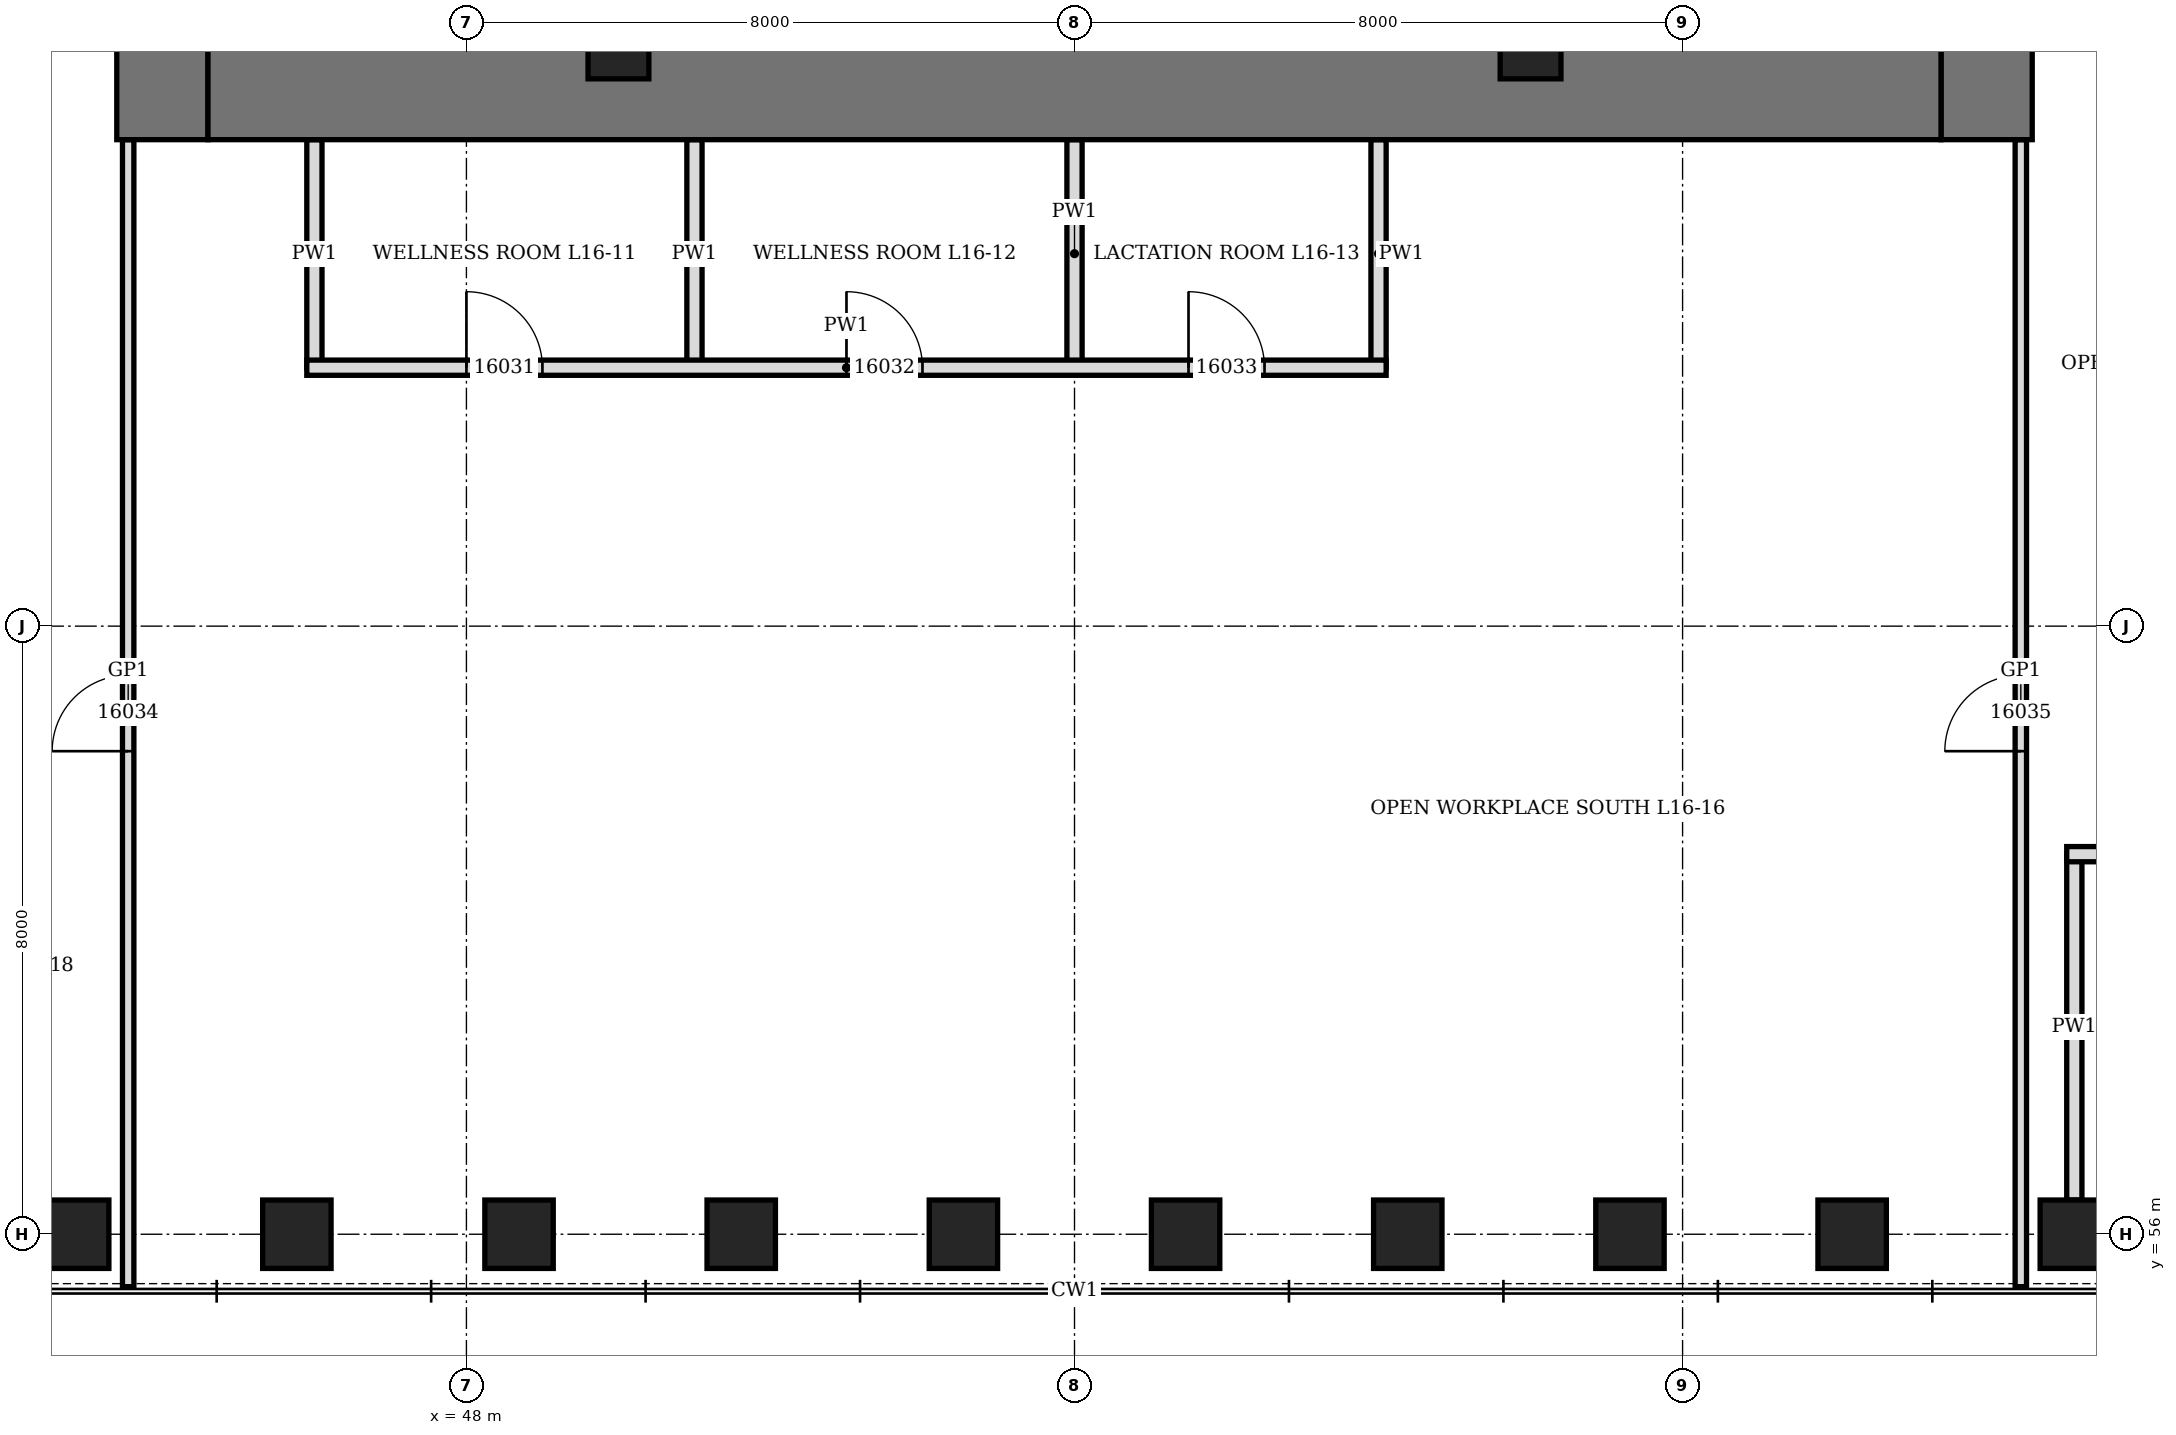
"""IFC4 building model, lengths in metres.
Left out: names, types, materials, properties, quantities, classifications, styles, units other than length and angle.
Written with IfcOpenShell. Run it as: python <this file> out.ifc"""

import sys

from ifc_helpers import new_model, si_unit, direction, frame, frame_2d, origin, origin_2d, place, context, subcontext, project, spatial, rectangle, hollow_rectangle, extrude, element, fill, save


model = new_model("IFC4")
c1 = context("Model", 3, precision=1e-05, world=origin(), true_north=direction((0.0, 1.0)))
c2 = subcontext(c1, "Body", "Model", "MODEL_VIEW")
j1 = project(units=[si_unit("LENGTHUNIT", "METRE"), si_unit("PLANEANGLEUNIT", "RADIAN")], contexts=[c1])
p1 = place(None, origin())
s1 = spatial("IfcSite", under=j1, at=p1, CompositionType="ELEMENT")
p2 = place(p1, origin())
s2 = spatial("IfcBuilding", under=s1, at=p2, CompositionType="ELEMENT")
p3 = place(p2, frame((0.0, 0.0, 76.9)))
s3 = spatial("IfcBuildingStorey", under=s2, at=p3, CompositionType="ELEMENT", Elevation=76.9)
for number, where, z_axis, x_axis in (
    (1, (42.846, 56.0, 0.0), (0.0, 0.0, 1.0), (1.0, 0.0, 0.0)),
    (2, (45.769, 56.0, 0.0), (0.0, 0.0, 1.0), (1.0, 0.0, 0.0)),
    (3, (48.692, 56.0, 0.0), (0.0, 0.0, 1.0), (1.0, 0.0, 0.0)),
    (4, (51.615, 56.0, 0.0), (0.0, 0.0, 1.0), (1.0, 0.0, 0.0)),
    (5, (54.539, 56.0, 0.0), (0.0, 0.0, 1.0), (1.0, 0.0, 0.0)),
    (6, (57.461, 56.0, 0.0), (0.0, 0.0, 1.0), (1.0, 0.0, 0.0)),
    (7, (60.385, 56.0, 0.0), (0.0, 0.0, 1.0), (1.0, 0.0, 0.0)),
    (8, (63.308, 56.0, 0.0), (0.0, 0.0, 1.0), (1.0, 0.0, 0.0)),
    (9, (66.231, 56.0, 0.0), (0.0, 0.0, 1.0), (1.0, 0.0, 0.0)),
    (10, (69.154, 56.0, 0.0), (0.0, 0.0, 1.0), (1.0, 0.0, 0.0)),
):
    element("IfcColumn", number, at=place(p3, frame(where, z_axis=z_axis, x_axis=x_axis)), inside=s3, PredefinedType="COLUMN", context=c2, shape_type="SweptSolid", body=[
        extrude(hollow_rectangle(XDim=0.9, YDim=0.9, WallThickness=0.12, at=origin_2d()), origin(), (0.0, 0.0, 1.0), 4.2),
    ])
p4 = place(p3, frame((44.0, 70.4, 0.0), z_axis=(0.0, 0.0, 1.0), x_axis=(0.0, 1.0, 0.0)))
e11 = element("IfcWall", 11, at=p4, inside=s3, PredefinedType="SHEAR", context=c2, shape_type="SweptSolid", body=[
    extrude(rectangle(XDim=19.2, YDim=1.2, at=frame_2d((9.6, 0.0))), origin(), (0.0, 0.0, 1.0), 4.2),
])
p5 = place(p4, frame((8.6, 0.0, 0.0)))
e12 = element("IfcOpeningElement", 12, at=p5, cuts=e11, PredefinedType="OPENING", context=c2, shape_type="SweptSolid", body=[
    extrude(rectangle(XDim=2.0, YDim=2.4, at=frame_2d((1.0, 1.2))), frame((0.0, 0.61, 0.0), z_axis=(0.0, -1.0, 0.0), x_axis=(1.0, 0.0, 0.0)), (0.0, 0.0, 1.0), 1.22),
])
p6 = place(p3, frame((68.0, 70.4, 0.0), z_axis=(0.0, 0.0, 1.0), x_axis=(0.0, 1.0, 0.0)))
e13 = element("IfcWall", 13, at=p6, inside=s3, PredefinedType="SHEAR", context=c2, shape_type="SweptSolid", body=[
    extrude(rectangle(XDim=19.2, YDim=1.2, at=frame_2d((9.6, 0.0))), origin(), (0.0, 0.0, 1.0), 4.2),
])
p7 = place(p6, frame((8.6, 0.0, 0.0)))
e14 = element("IfcOpeningElement", 14, at=p7, cuts=e13, PredefinedType="OPENING", context=c2, shape_type="SweptSolid", body=[
    extrude(rectangle(XDim=2.0, YDim=2.4, at=frame_2d((1.0, 1.2))), frame((0.0, 0.61, 0.0), z_axis=(0.0, -1.0, 0.0), x_axis=(1.0, 0.0, 0.0)), (0.0, 0.0, 1.0), 1.22),
])
p8 = place(p3, frame((44.6, 71.0, 0.0), z_axis=(0.0, 0.0, 1.0), x_axis=(1.0, 0.0, 0.0)))
e15 = element("IfcWall", 15, at=p8, inside=s3, PredefinedType="SHEAR", context=c2, shape_type="SweptSolid", body=[
    extrude(rectangle(XDim=22.8, YDim=1.2, at=frame_2d((11.4, 0.0))), origin(), (0.0, 0.0, 1.0), 4.2),
])
for number, where, z_axis, x_axis in (
    (16, (50.0, 71.6, 0.0), (0.0, 0.0, 1.0), (1.0, 0.0, 0.0)),
    (17, (62.0, 71.6, 0.0), (0.0, 0.0, 1.0), (1.0, 0.0, 0.0)),
):
    element("IfcColumn", number, at=place(p3, frame(where, z_axis=z_axis, x_axis=x_axis)), inside=s3, PredefinedType="COLUMN", context=c2, shape_type="SweptSolid", body=[
        extrude(hollow_rectangle(XDim=0.8, YDim=0.8, WallThickness=0.1, at=origin_2d()), origin(), (0.0, 0.0, 1.0), 4.2),
    ])
p9 = place(p3, frame((69.154, 56.45, 0.0), z_axis=(0.0, 0.0, 1.0), x_axis=(0.0, 1.0, 0.0)))
e18 = element("IfcWall", 18, at=p9, inside=s3, PredefinedType="PARTITIONING", context=c2, shape_type="SweptSolid", body=[
    extrude(rectangle(XDim=4.55, YDim=0.2, at=frame_2d((2.275, 0.0))), origin(), (0.0, 0.0, 1.0), 3.278),
])
for number, where, z_axis, x_axis in (
    (19, (46.0, 67.4, 0.0), (0.0, 0.0, 1.0), (0.0, 1.0, 0.0)),
    (20, (51.0, 67.4, 0.0), (0.0, 0.0, 1.0), (0.0, 1.0, 0.0)),
    (21, (56.0, 67.4, 0.0), (0.0, 0.0, 1.0), (0.0, 1.0, 0.0)),
    (22, (60.0, 67.4, 0.0), (0.0, 0.0, 1.0), (0.0, 1.0, 0.0)),
):
    element("IfcWall", number, at=place(p3, frame(where, z_axis=z_axis, x_axis=x_axis)), inside=s3, PredefinedType="PARTITIONING", context=c2, shape_type="SweptSolid", body=[
        extrude(rectangle(XDim=3.0, YDim=0.2, at=frame_2d((1.5, 0.0))), origin(), (0.0, 0.0, 1.0), 4.04),
    ])
p10 = place(p3, frame((69.054, 61.0, 0.0), z_axis=(0.0, 0.0, 1.0), x_axis=(1.0, 0.0, 0.0)))
e23 = element("IfcWall", 23, at=p10, inside=s3, PredefinedType="PARTITIONING", context=c2, shape_type="SweptSolid", body=[
    extrude(rectangle(XDim=5.496, YDim=0.2, at=frame_2d((2.748, 0.0))), origin(), (0.0, 0.0, 1.0), 4.04),
])
p11 = place(p10, frame((1.062, 0.0, 0.0)))
e24 = element("IfcOpeningElement", 24, at=p11, cuts=e23, PredefinedType="OPENING", context=c2, shape_type="SweptSolid", body=[
    extrude(rectangle(XDim=1.0, YDim=2.1, at=frame_2d((0.5, 1.05))), frame((0.0, 0.11, 0.0), z_axis=(0.0, -1.0, 0.0), x_axis=(1.0, 0.0, 0.0)), (0.0, 0.0, 1.0), 0.22),
])
p12 = place(p3, frame((45.9, 67.4, 0.0), z_axis=(0.0, 0.0, 1.0), x_axis=(1.0, 0.0, 0.0)))
e25 = element("IfcWall", 25, at=p12, inside=s3, PredefinedType="PARTITIONING", context=c2, shape_type="SweptSolid", body=[
    extrude(rectangle(XDim=14.2, YDim=0.2, at=frame_2d((7.1, 0.0))), origin(), (0.0, 0.0, 1.0), 4.04),
])
p13 = place(p12, frame((2.1, 0.0, 0.0)))
e26 = element("IfcOpeningElement", 26, at=p13, cuts=e25, PredefinedType="OPENING", context=c2, shape_type="SweptSolid", body=[
    extrude(rectangle(XDim=1.0, YDim=2.1, at=frame_2d((0.5, 1.05))), frame((0.0, 0.11, 0.0), z_axis=(0.0, -1.0, 0.0), x_axis=(1.0, 0.0, 0.0)), (0.0, 0.0, 1.0), 0.22),
])
p14 = place(p12, frame((7.1, 0.0, 0.0)))
e27 = element("IfcOpeningElement", 27, at=p14, cuts=e25, PredefinedType="OPENING", context=c2, shape_type="SweptSolid", body=[
    extrude(rectangle(XDim=1.0, YDim=2.1, at=frame_2d((0.5, 1.05))), frame((0.0, 0.11, 0.0), z_axis=(0.0, -1.0, 0.0), x_axis=(1.0, 0.0, 0.0)), (0.0, 0.0, 1.0), 0.22),
])
p15 = place(p12, frame((11.6, 0.0, 0.0)))
e28 = element("IfcOpeningElement", 28, at=p15, cuts=e25, PredefinedType="OPENING", context=c2, shape_type="SweptSolid", body=[
    extrude(rectangle(XDim=1.0, YDim=2.1, at=frame_2d((0.5, 1.05))), frame((0.0, 0.11, 0.0), z_axis=(0.0, -1.0, 0.0), x_axis=(1.0, 0.0, 0.0)), (0.0, 0.0, 1.0), 0.22),
])
p16 = place(p3, frame((43.55, 55.31, 0.0), z_axis=(0.0, 0.0, 1.0), x_axis=(0.0, 1.0, 0.0)))
e29 = element("IfcWall", 29, at=p16, inside=s3, PredefinedType="PARTITIONING", context=c2, shape_type="SweptSolid", body=[
    extrude(rectangle(XDim=15.09, YDim=0.15, at=frame_2d((7.545, 0.0))), origin(), (0.0, 0.0, 1.0), 4.04),
])
p17 = place(p16, frame((7.045, 0.0, 0.0)))
e30 = element("IfcOpeningElement", 30, at=p17, cuts=e29, PredefinedType="OPENING", context=c2, shape_type="SweptSolid", body=[
    extrude(rectangle(XDim=1.0, YDim=2.4, at=frame_2d((0.5, 1.2))), frame((0.0, 0.085, 0.0), z_axis=(0.0, -1.0, 0.0), x_axis=(1.0, 0.0, 0.0)), (0.0, 0.0, 1.0), 0.17),
])
p18 = place(p3, frame((68.45, 55.31, 0.0), z_axis=(0.0, 0.0, 1.0), x_axis=(0.0, 1.0, 0.0)))
e31 = element("IfcWall", 31, at=p18, inside=s3, PredefinedType="PARTITIONING", context=c2, shape_type="SweptSolid", body=[
    extrude(rectangle(XDim=15.09, YDim=0.15, at=frame_2d((7.545, 0.0))), origin(), (0.0, 0.0, 1.0), 4.04),
])
p19 = place(p18, frame((7.045, 0.0, 0.0)))
e32 = element("IfcOpeningElement", 32, at=p19, cuts=e31, PredefinedType="OPENING", context=c2, shape_type="SweptSolid", body=[
    extrude(rectangle(XDim=1.0, YDim=2.4, at=frame_2d((0.5, 1.2))), frame((0.0, 0.085, 0.0), z_axis=(0.0, -1.0, 0.0), x_axis=(1.0, 0.0, 0.0)), (0.0, 0.0, 1.0), 0.17),
])
p20 = place(p13, origin())
e33 = element("IfcDoor", 33, at=p20, inside=s3, OperationType="SINGLE_SWING_LEFT", PredefinedType="DOOR", context=c2, shape_type="SweptSolid", body=[
    extrude(rectangle(XDim=1.0, YDim=2.1, at=frame_2d((0.5, 1.05))), frame((0.0, 0.1, 0.0), z_axis=(0.0, -1.0, 0.0), x_axis=(1.0, 0.0, 0.0)), (0.0, 0.0, 1.0), 0.199),
])
fill(e26, e33)
p21 = place(p14, origin())
e34 = element("IfcDoor", 34, at=p21, inside=s3, OperationType="SINGLE_SWING_LEFT", PredefinedType="DOOR", context=c2, shape_type="SweptSolid", body=[
    extrude(rectangle(XDim=1.0, YDim=2.1, at=frame_2d((0.5, 1.05))), frame((0.0, 0.1, 0.0), z_axis=(0.0, -1.0, 0.0), x_axis=(1.0, 0.0, 0.0)), (0.0, 0.0, 1.0), 0.199),
])
fill(e27, e34)
p22 = place(p15, origin())
e35 = element("IfcDoor", 35, at=p22, inside=s3, OperationType="SINGLE_SWING_LEFT", PredefinedType="DOOR", context=c2, shape_type="SweptSolid", body=[
    extrude(rectangle(XDim=1.0, YDim=2.1, at=frame_2d((0.5, 1.05))), frame((0.0, 0.1, 0.0), z_axis=(0.0, -1.0, 0.0), x_axis=(1.0, 0.0, 0.0)), (0.0, 0.0, 1.0), 0.199),
])
fill(e28, e35)
p23 = place(p17, origin())
e36 = element("IfcDoor", 36, at=p23, inside=s3, OperationType="SINGLE_SWING_RIGHT", PredefinedType="DOOR", context=c2, shape_type="SweptSolid", body=[
    extrude(rectangle(XDim=1.0, YDim=2.4, at=frame_2d((0.5, 1.2))), frame((0.0, 0.075, 0.0), z_axis=(0.0, -1.0, 0.0), x_axis=(1.0, 0.0, 0.0)), (0.0, 0.0, 1.0), 0.149),
])
fill(e30, e36)
p24 = place(p19, origin())
e37 = element("IfcDoor", 37, at=p24, inside=s3, OperationType="SINGLE_SWING_RIGHT", PredefinedType="DOOR", context=c2, shape_type="SweptSolid", body=[
    extrude(rectangle(XDim=1.0, YDim=2.4, at=frame_2d((0.5, 1.2))), frame((0.0, 0.075, 0.0), z_axis=(0.0, -1.0, 0.0), x_axis=(1.0, 0.0, 0.0)), (0.0, 0.0, 1.0), 0.149),
])
fill(e32, e37)
save(model, sys.argv[1])
